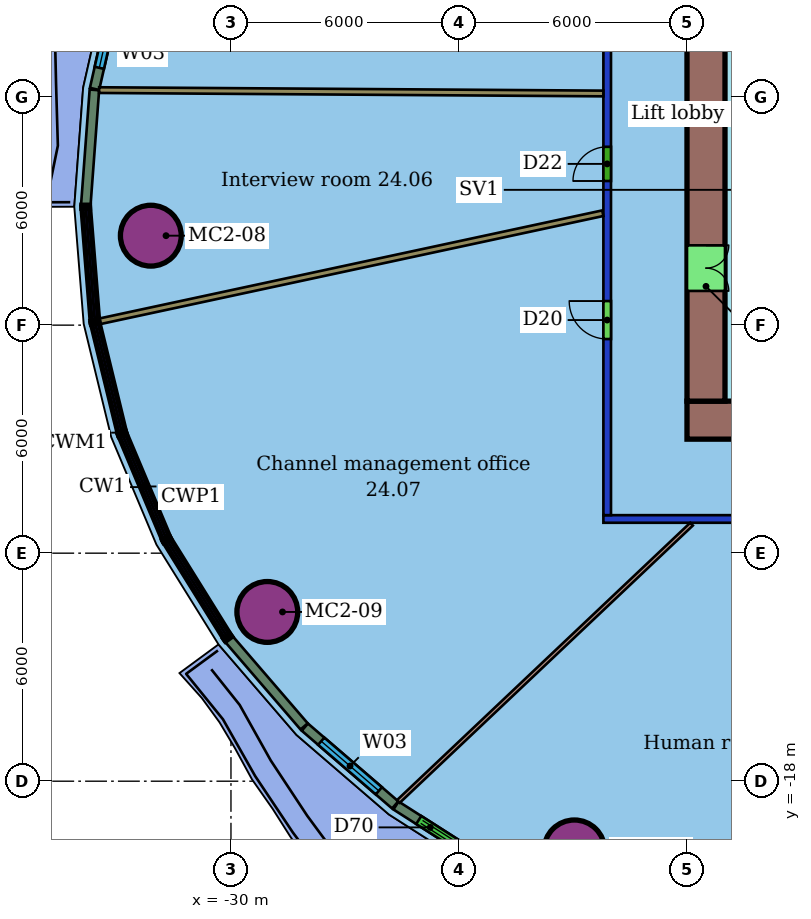
"""IFC4 building model, lengths in metres.
Left out: names, types, materials, properties, quantities, classifications, styles, units other than length and angle.
Written with IfcOpenShell. Run it as: python <this file> out.ifc"""

import sys

from ifc_helpers import new_model, si_unit, direction, frame, frame_2d, origin, origin_2d, place, context, subcontext, project, spatial, rectangle, hollow_circle, extrude, element, fill, save


model = new_model("IFC4")
c1 = context("Model", 3, precision=1e-05, world=origin(), true_north=direction((0.0, 1.0)))
c2 = subcontext(c1, "Body", "Model", "MODEL_VIEW")
j1 = project(units=[si_unit("LENGTHUNIT", "METRE"), si_unit("PLANEANGLEUNIT", "RADIAN")], contexts=[c1])
p1 = place(None, origin())
s1 = spatial("IfcSite", under=j1, at=p1, CompositionType="ELEMENT")
p2 = place(p1, origin())
s2 = spatial("IfcBuilding", under=s1, at=p2, CompositionType="ELEMENT")
p3 = place(p2, frame((0.0, 0.0, 106.6)))
s3 = spatial("IfcBuildingStorey", under=s2, at=p3, CompositionType="ELEMENT", Elevation=106.6)
for number, where, z_axis, x_axis in (
    (1, (-32.109, -3.646, 0.0), (0.0, 0.0, 1.0), (1.0, 0.0, 0.0)),
    (2, (-29.043, -13.547, 0.0), (0.0, 0.0, 1.0), (1.0, 0.0, 0.0)),
    (3, (-20.963, -19.821, 0.0), (0.0, 0.0, 1.0), (1.0, 0.0, 0.0)),
):
    element("IfcColumn", number, at=place(p3, frame(where, z_axis=z_axis, x_axis=x_axis)), inside=s3, PredefinedType="COLUMN", context=c2, shape_type="SweptSolid", body=[
        extrude(hollow_circle(Radius=0.8, WallThickness=0.055, at=origin_2d()), origin(), (0.0, 0.0, 1.0), 3.45),
    ])
p4 = place(p3, frame((8.2, -11.1, 0.0), z_axis=(0.0, 0.0, 1.0), x_axis=(-1.0, 0.0, 0.0)))
e4 = element("IfcWall", 4, at=p4, inside=s3, PredefinedType="PARTITIONING", context=c2, shape_type="SweptSolid", body=[
    extrude(rectangle(XDim=28.4, YDim=0.2, at=frame_2d((14.2, 0.0))), origin(), (0.0, 0.0, 1.0), 3.0),
])
p5 = place(p4, frame((18.815, 0.0, 0.0)))
e5 = element("IfcOpeningElement", 5, at=p5, cuts=e4, PredefinedType="OPENING", context=c2, shape_type="SweptSolid", body=[
    extrude(rectangle(XDim=1.0, YDim=2.1, at=frame_2d((0.5, 1.05))), frame((0.0, 0.11, 0.0), z_axis=(0.0, -1.0, 0.0), x_axis=(1.0, 0.0, 0.0)), (0.0, 0.0, 1.0), 0.22),
])
p6 = place(p4, frame((9.712, 0.0, 0.0)))
e6 = element("IfcOpeningElement", 6, at=p6, cuts=e4, PredefinedType="OPENING", context=c2, shape_type="SweptSolid", body=[
    extrude(rectangle(XDim=1.8, YDim=2.1, at=frame_2d((0.9, 1.05))), frame((0.0, 0.11, 0.0), z_axis=(0.0, -1.0, 0.0), x_axis=(1.0, 0.0, 0.0)), (0.0, 0.0, 1.0), 0.22),
])
p7 = place(p3, frame((-20.1, -11.0, 0.0), z_axis=(0.0, 0.0, 1.0), x_axis=(0.0, 1.0, 0.0)))
e7 = element("IfcWall", 7, at=p7, inside=s3, PredefinedType="PARTITIONING", context=c2, shape_type="SweptSolid", body=[
    extrude(rectangle(XDim=22.0, YDim=0.2, at=frame_2d((11.0, 0.0))), origin(), (0.0, 0.0, 1.0), 3.0),
])
p8 = place(p7, frame((15.196, 0.0, 0.0)))
e8 = element("IfcOpeningElement", 8, at=p8, cuts=e7, PredefinedType="OPENING", context=c2, shape_type="SweptSolid", body=[
    extrude(rectangle(XDim=1.5, YDim=2.1, at=frame_2d((0.75, 1.05))), frame((0.0, 0.11, 0.0), z_axis=(0.0, -1.0, 0.0), x_axis=(1.0, 0.0, 0.0)), (0.0, 0.0, 1.0), 0.22),
])
p9 = place(p7, frame((8.793, 0.0, 0.0)))
e9 = element("IfcOpeningElement", 9, at=p9, cuts=e7, PredefinedType="OPENING", context=c2, shape_type="SweptSolid", body=[
    extrude(rectangle(XDim=0.9, YDim=2.1, at=frame_2d((0.45, 1.05))), frame((0.0, 0.11, 0.0), z_axis=(0.0, -1.0, 0.0), x_axis=(1.0, 0.0, 0.0)), (0.0, 0.0, 1.0), 0.22),
])
p10 = place(p7, frame((4.634, 0.0, 0.0)))
e10 = element("IfcOpeningElement", 10, at=p10, cuts=e7, PredefinedType="OPENING", context=c2, shape_type="SweptSolid", body=[
    extrude(rectangle(XDim=1.0, YDim=2.1, at=frame_2d((0.5, 1.05))), frame((0.0, 0.11, 0.0), z_axis=(0.0, -1.0, 0.0), x_axis=(1.0, 0.0, 0.0)), (0.0, 0.0, 1.0), 0.22),
])
p11 = place(p3, frame((-33.469, 0.184, 0.0), z_axis=(0.0, 0.0, 1.0), x_axis=(0.999977573626, -0.00669718191, 0.0)))
e11 = element("IfcWall", 11, at=p11, inside=s3, PredefinedType="PARTITIONING", context=c2, shape_type="SweptSolid", body=[
    extrude(rectangle(XDim=13.269, YDim=0.15, at=frame_2d((6.635, 0.0))), origin(), (0.0, 0.0, 1.0), 3.45),
])
p12 = place(p3, frame((-33.456, -5.9, 0.0), z_axis=(0.0, 0.0, 1.0), x_axis=(0.977679300962, 0.21010279501, 0.0)))
e12 = element("IfcWall", 12, at=p12, inside=s3, PredefinedType="PARTITIONING", context=c2, shape_type="SweptSolid", body=[
    extrude(rectangle(XDim=13.542, YDim=0.15, at=frame_2d((6.771, 0.0))), origin(), (0.0, 0.0, 1.0), 3.45),
])
p13 = place(p3, frame((-25.594, -18.532, 0.0), z_axis=(0.0, 0.0, 1.0), x_axis=(0.7265168172, 0.687148684293, 0.0)))
e13 = element("IfcWall", 13, at=p13, inside=s3, PredefinedType="PARTITIONING", context=c2, shape_type="SweptSolid", body=[
    extrude(rectangle(XDim=10.617, YDim=0.1, at=frame_2d((5.309, 0.0))), origin(), (0.0, 0.0, 1.0), 3.45),
])
p14 = place(p3, frame((-32.895, 3.275, 0.0), z_axis=(0.0, 0.0, 1.0), x_axis=(-0.221533658601, -0.975152725529, 0.0)))
e14 = element("IfcWall", 14, at=p14, inside=s3, PredefinedType="SOLIDWALL", context=c2, shape_type="SweptSolid", body=[
    extrude(rectangle(XDim=3.137, YDim=0.25, at=frame_2d((1.569, 0.0))), origin(), (0.0, 0.0, 1.0), 3.05),
])
p15 = place(p14, frame((0.569, 0.0, 0.9)))
e15 = element("IfcOpeningElement", 15, at=p15, cuts=e14, PredefinedType="OPENING", context=c2, shape_type="SweptSolid", body=[
    extrude(rectangle(XDim=2.0, YDim=2.1, at=frame_2d((1.0, 1.05))), frame((0.0, 0.135, 0.0), z_axis=(0.0, -1.0, 0.0), x_axis=(1.0, 0.0, 0.0)), (0.0, 0.0, 1.0), 0.27),
])
for number, where, z_axis, x_axis in (
    (16, (-33.594, 0.189, 0.0), (0.0, 0.0, 1.0), (-0.074, -0.997, 0.0)),
    (17, (-30.05, -14.265, 0.0), (0.0, 0.0, 1.0), (0.653, -0.758, 0.0)),
):
    element("IfcWall", number, at=place(p3, frame(where, z_axis=z_axis, x_axis=x_axis)), inside=s3, PredefinedType="SOLIDWALL", context=c2, shape_type="SweptSolid", body=[
        extrude(rectangle(XDim=3.027, YDim=0.25, at=frame_2d((1.513, 0.0))), origin(), (0.0, 0.0, 1.0), 3.05),
    ])
p16 = place(p3, frame((-28.056, -16.577, 0.0), z_axis=(0.0, 0.0, 1.0), x_axis=(0.757892764479, -0.652379151683, 0.0)))
e18 = element("IfcWall", 18, at=p16, inside=s3, PredefinedType="SOLIDWALL", context=c2, shape_type="SweptSolid", body=[
    extrude(rectangle(XDim=3.137, YDim=0.25, at=frame_2d((1.569, 0.0))), origin(), (0.0, 0.0, 1.0), 3.05),
])
p17 = place(p16, frame((0.569, 0.0, 0.9)))
e19 = element("IfcOpeningElement", 19, at=p17, cuts=e18, PredefinedType="OPENING", context=c2, shape_type="SweptSolid", body=[
    extrude(rectangle(XDim=2.0, YDim=2.1, at=frame_2d((1.0, 1.05))), frame((0.0, 0.135, 0.0), z_axis=(0.0, -1.0, 0.0), x_axis=(1.0, 0.0, 0.0)), (0.0, 0.0, 1.0), 0.27),
])
p18 = place(p3, frame((-25.657, -18.639, 0.0), z_axis=(0.0, 0.0, 1.0), x_axis=(0.842783191824, -0.538253185387, 0.0)))
e20 = element("IfcWall", 20, at=p18, inside=s3, PredefinedType="SOLIDWALL", context=c2, shape_type="SweptSolid", body=[
    extrude(rectangle(XDim=3.22, YDim=0.25, at=frame_2d((1.61, 0.0))), origin(), (0.0, 0.0, 1.0), 3.05),
])
p19 = place(p18, frame((0.71, 0.0, 0.0)))
e21 = element("IfcOpeningElement", 21, at=p19, cuts=e20, PredefinedType="OPENING", context=c2, shape_type="SweptSolid", body=[
    extrude(rectangle(XDim=1.8, YDim=2.4, at=frame_2d((0.9, 1.2))), frame((0.0, 0.135, 0.0), z_axis=(0.0, -1.0, 0.0), x_axis=(1.0, 0.0, 0.0)), (0.0, 0.0, 1.0), 0.27),
])
p20 = place(p3, frame((-18.0, -8.5, 0.0), z_axis=(0.0, 0.0, 1.0), x_axis=(1.0, 0.0, 0.0)))
e22 = element("IfcWall", 22, at=p20, inside=s3, PredefinedType="SHEAR", context=c2, shape_type="SweptSolid", body=[
    extrude(rectangle(XDim=24.0, YDim=1.0, at=frame_2d((12.0, 0.0))), origin(), (0.0, 0.0, 1.0), 3.3),
])
p21 = place(p20, frame((6.0, 0.0, 0.0)))
e23 = element("IfcOpeningElement", 23, at=p21, cuts=e22, PredefinedType="OPENING", context=c2, shape_type="SweptSolid", body=[
    extrude(rectangle(XDim=1.2, YDim=2.1, at=frame_2d((0.6, 1.05))), frame((0.0, 0.51, 0.0), z_axis=(0.0, -1.0, 0.0), x_axis=(1.0, 0.0, 0.0)), (0.0, 0.0, 1.0), 1.02),
])
p22 = place(p3, frame((-17.5, 8.0, 0.0), z_axis=(0.0, 0.0, 1.0), x_axis=(0.0, -1.0, 0.0)))
e24 = element("IfcWall", 24, at=p22, inside=s3, PredefinedType="SHEAR", context=c2, shape_type="SweptSolid", body=[
    extrude(rectangle(XDim=16.0, YDim=1.0, at=frame_2d((8.0, 0.0))), origin(), (0.0, 0.0, 1.0), 3.3),
])
p23 = place(p22, frame((11.9, 0.0, 0.0)))
e25 = element("IfcOpeningElement", 25, at=p23, cuts=e24, PredefinedType="OPENING", context=c2, shape_type="SweptSolid", body=[
    extrude(rectangle(XDim=1.2, YDim=2.1, at=frame_2d((0.6, 1.05))), frame((0.0, 0.51, 0.0), z_axis=(0.0, -1.0, 0.0), x_axis=(1.0, 0.0, 0.0)), (0.0, 0.0, 1.0), 1.02),
])
p24 = place(p22, frame((2.9, 0.0, 0.0)))
e26 = element("IfcOpeningElement", 26, at=p24, cuts=e24, PredefinedType="OPENING", context=c2, shape_type="SweptSolid", body=[
    extrude(rectangle(XDim=1.2, YDim=2.1, at=frame_2d((0.6, 1.05))), frame((0.0, 0.51, 0.0), z_axis=(0.0, -1.0, 0.0), x_axis=(1.0, 0.0, 0.0)), (0.0, 0.0, 1.0), 1.02),
])
p25 = place(p9, origin())
e27 = element("IfcDoor", 27, at=p25, inside=s3, OperationType="SINGLE_SWING_LEFT", PredefinedType="DOOR", context=c2, shape_type="SweptSolid", body=[
    extrude(rectangle(XDim=0.9, YDim=2.1, at=frame_2d((0.45, 1.05))), frame((0.0, 0.025, 0.0), z_axis=(0.0, -1.0, 0.0), x_axis=(1.0, 0.0, 0.0)), (0.0, 0.0, 1.0), 0.05),
])
fill(e9, e27)
p26 = place(p10, origin())
e28 = element("IfcDoor", 28, at=p26, inside=s3, OperationType="SINGLE_SWING_RIGHT", PredefinedType="DOOR", context=c2, shape_type="SweptSolid", body=[
    extrude(rectangle(XDim=1.0, YDim=2.1, at=frame_2d((0.5, 1.05))), frame((0.0, 0.025, 0.0), z_axis=(0.0, -1.0, 0.0), x_axis=(1.0, 0.0, 0.0)), (0.0, 0.0, 1.0), 0.05),
])
fill(e10, e28)
p27 = place(p15, origin())
e29 = element("IfcWindow", 29, at=p27, inside=s3, PartitioningType="SINGLE_PANEL", PredefinedType="WINDOW", context=c2, shape_type="SweptSolid", body=[
    extrude(rectangle(XDim=2.0, YDim=2.1, at=frame_2d((1.0, 1.05))), frame((0.0, 0.03, 0.0), z_axis=(0.0, -1.0, 0.0), x_axis=(1.0, 0.0, 0.0)), (0.0, 0.0, 1.0), 0.06),
])
fill(e15, e29)
p28 = place(p17, origin())
e30 = element("IfcWindow", 30, at=p28, inside=s3, PartitioningType="SINGLE_PANEL", PredefinedType="WINDOW", context=c2, shape_type="SweptSolid", body=[
    extrude(rectangle(XDim=2.0, YDim=2.1, at=frame_2d((1.0, 1.05))), frame((0.0, 0.03, 0.0), z_axis=(0.0, -1.0, 0.0), x_axis=(1.0, 0.0, 0.0)), (0.0, 0.0, 1.0), 0.06),
])
fill(e19, e30)
p29 = place(p19, origin())
e31 = element("IfcDoor", 31, at=p29, inside=s3, OperationType="DOUBLE_DOOR_SLIDING", PredefinedType="DOOR", context=c2, shape_type="SweptSolid", body=[
    extrude(rectangle(XDim=1.8, YDim=2.4, at=frame_2d((0.9, 1.2))), frame((0.0, 0.025, 0.0), z_axis=(0.0, -1.0, 0.0), x_axis=(1.0, 0.0, 0.0)), (0.0, 0.0, 1.0), 0.05),
])
fill(e21, e31)
p30 = place(p23, origin())
e32 = element("IfcDoor", 32, at=p30, inside=s3, OperationType="DOUBLE_DOOR_SINGLE_SWING", PredefinedType="NOTDEFINED", context=c2, shape_type="SweptSolid", body=[
    extrude(rectangle(XDim=1.2, YDim=2.1, at=frame_2d((0.6, 1.05))), frame((0.0, 0.025, 0.0), z_axis=(0.0, -1.0, 0.0), x_axis=(1.0, 0.0, 0.0)), (0.0, 0.0, 1.0), 0.05),
])
fill(e25, e32)
save(model, sys.argv[1])
